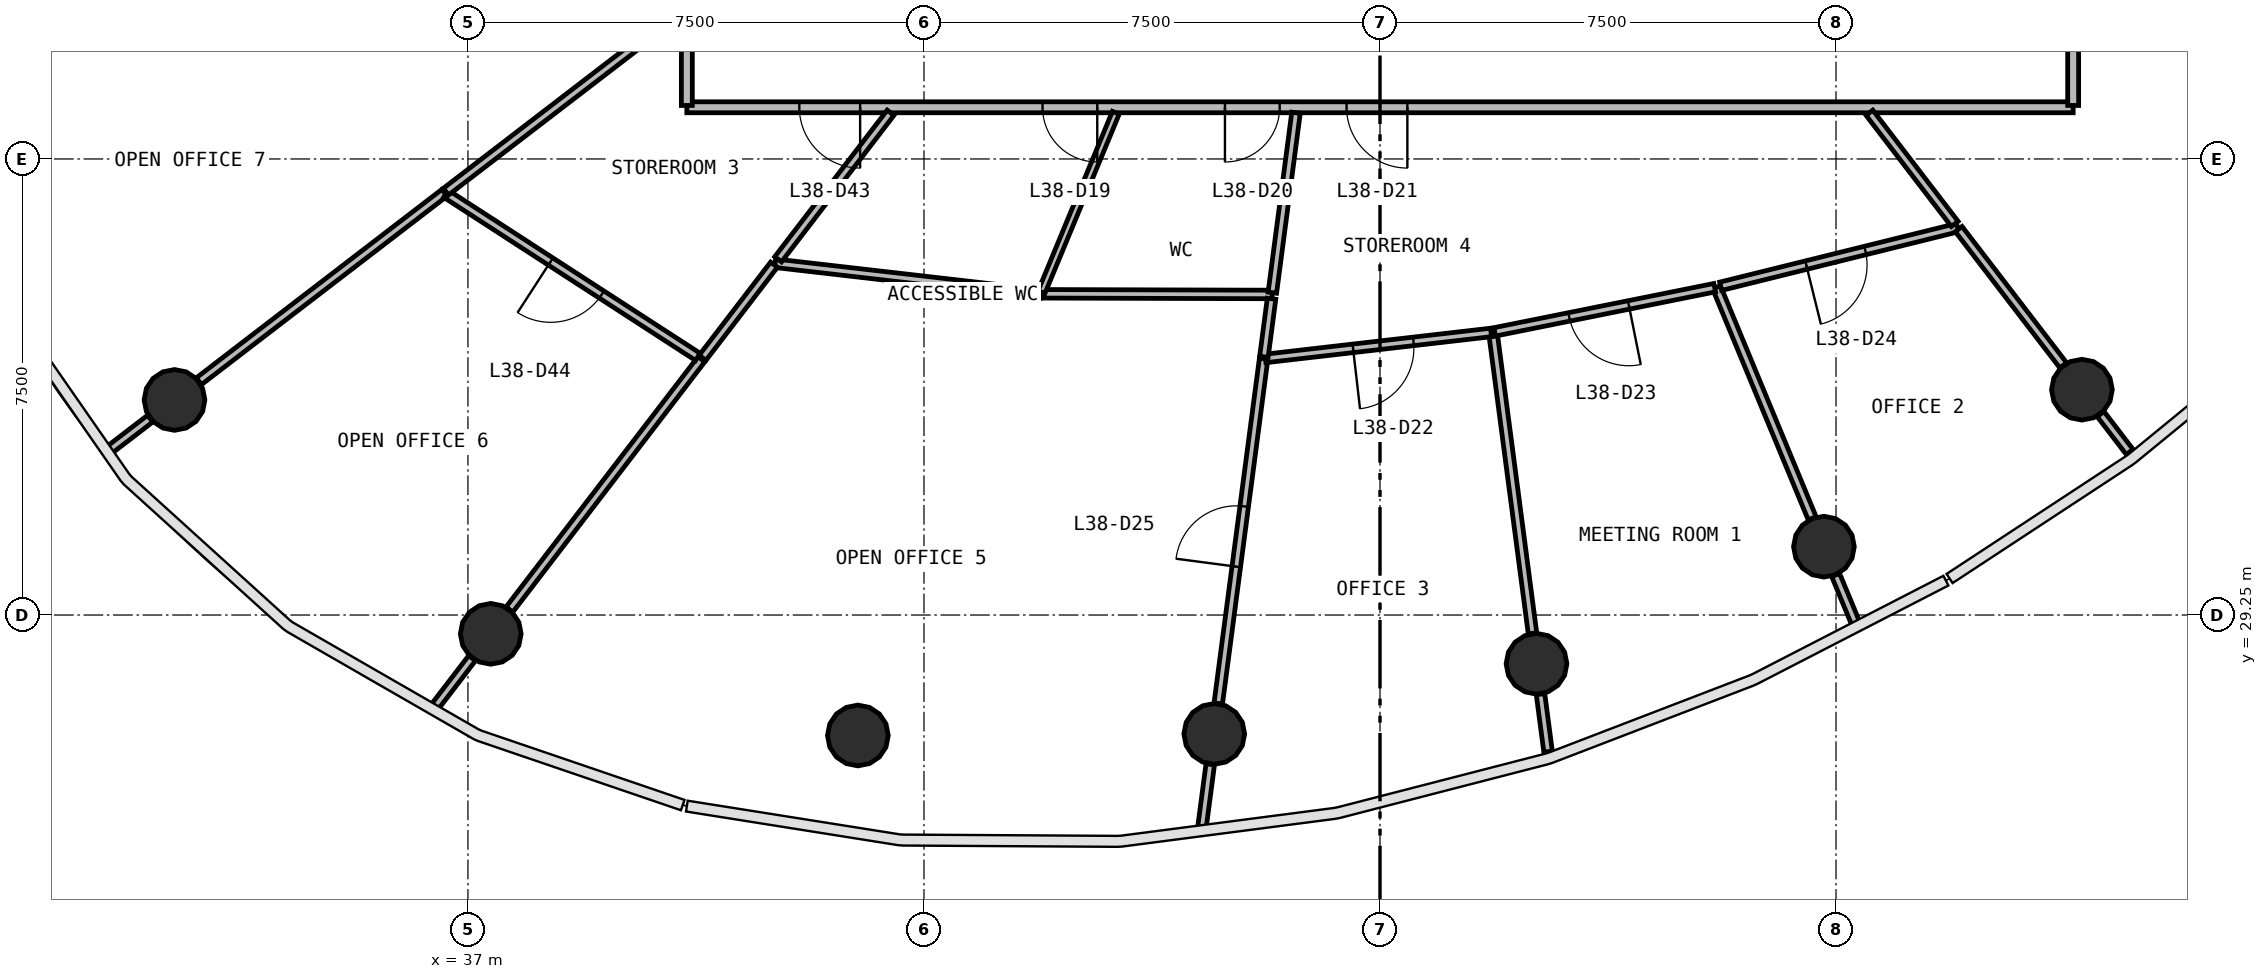
"""IFC4 building model, lengths in metres.
Left out: names, types, materials, properties, quantities, classifications, styles, units other than length and angle.
Written with IfcOpenShell. Run it as: python <this file> out.ifc"""

import sys

from ifc_helpers import new_model, si_unit, direction, frame, frame_2d, origin, origin_2d, place, context, subcontext, project, spatial, rectangle, circle, extrude, source, transform, mapped, element, fill, save


model = new_model("IFC4")
c1 = context("Model", 3, precision=1e-05, world=origin(), true_north=direction((0.0, 1.0)))
c2 = subcontext(c1, "Body", "Model", "MODEL_VIEW")
j1 = project(units=[si_unit("LENGTHUNIT", "METRE"), si_unit("PLANEANGLEUNIT", "RADIAN")], contexts=[c1])
p1 = place(None, origin())
s1 = spatial("IfcSite", under=j1, at=p1, CompositionType="ELEMENT")
p2 = place(p1, origin())
s2 = spatial("IfcBuilding", under=s1, at=p2, CompositionType="ELEMENT")
p3 = place(p2, frame((0.0, 0.0, 160.4)))
s3 = spatial("IfcBuildingStorey", under=s2, at=p3, CompositionType="ELEMENT", Elevation=160.4)
m1 = source(origin(), c2, "Body", "SweptSolid", [
    extrude(circle(Radius=0.5, at=origin_2d()), origin(), (0.0, 0.0, 1.0), 3.9),
])
for number, where, z_axis, x_axis in (
    (1, (32.174, 32.787, 0.0), (0.0, 0.0, 1.0), (1.0, 0.0, 0.0)),
    (2, (37.375, 28.94, 0.0), (0.0, 0.0, 1.0), (1.0, 0.0, 0.0)),
    (3, (43.413, 27.269, 0.0), (0.0, 0.0, 1.0), (1.0, 0.0, 0.0)),
    (4, (49.274, 27.295, 0.0), (0.0, 0.0, 1.0), (1.0, 0.0, 0.0)),
    (5, (54.574, 28.449, 0.0), (0.0, 0.0, 1.0), (1.0, 0.0, 0.0)),
    (6, (59.301, 30.374, 0.0), (0.0, 0.0, 1.0), (1.0, 0.0, 0.0)),
    (7, (63.544, 32.956, 0.0), (0.0, 0.0, 1.0), (1.0, 0.0, 0.0)),
):
    element("IfcColumn", number, at=place(p3, frame(where, z_axis=z_axis, x_axis=x_axis)), inside=s3, PredefinedType="COLUMN", context=c2, shape_type="MappedRepresentation", body=[
        mapped(m1, transform((0.0, 0.0, 0.0), scale=1.0)),
    ])
p4 = place(p3, frame((63.4, 37.6, 0.0), z_axis=(0.0, 0.0, 1.0), x_axis=(-1.0, 0.0, 0.0)))
e8 = element("IfcWall", 8, at=p4, inside=s3, PredefinedType="PARTITIONING", context=c2, shape_type="SweptSolid", body=[
    extrude(rectangle(XDim=22.8, YDim=0.18, at=frame_2d((11.4, 0.0))), origin(), (0.0, 0.0, 1.0), 2.88),
])
p5 = place(p4, frame((16.05, 0.0, 0.0)))
e9 = element("IfcOpeningElement", 9, at=p5, cuts=e8, PredefinedType="OPENING", context=c2, shape_type="SweptSolid", body=[
    extrude(rectangle(XDim=0.9, YDim=2.1, at=frame_2d((0.45, 1.05))), frame((0.0, 0.1, 0.0), z_axis=(0.0, -1.0, 0.0), x_axis=(1.0, 0.0, 0.0)), (0.0, 0.0, 1.0), 0.2),
])
p6 = place(p4, frame((13.05, 0.0, 0.0)))
e10 = element("IfcOpeningElement", 10, at=p6, cuts=e8, PredefinedType="OPENING", context=c2, shape_type="SweptSolid", body=[
    extrude(rectangle(XDim=0.9, YDim=2.1, at=frame_2d((0.45, 1.05))), frame((0.0, 0.1, 0.0), z_axis=(0.0, -1.0, 0.0), x_axis=(1.0, 0.0, 0.0)), (0.0, 0.0, 1.0), 0.2),
])
p7 = place(p4, frame((10.95, 0.0, 0.0)))
e11 = element("IfcOpeningElement", 11, at=p7, cuts=e8, PredefinedType="OPENING", context=c2, shape_type="SweptSolid", body=[
    extrude(rectangle(XDim=1.0, YDim=2.1, at=frame_2d((0.5, 1.05))), frame((0.0, 0.1, 0.0), z_axis=(0.0, -1.0, 0.0), x_axis=(1.0, 0.0, 0.0)), (0.0, 0.0, 1.0), 0.2),
])
p8 = place(p4, frame((19.95, 0.0, 0.0)))
e12 = element("IfcOpeningElement", 12, at=p8, cuts=e8, PredefinedType="OPENING", context=c2, shape_type="SweptSolid", body=[
    extrude(rectangle(XDim=1.0, YDim=2.1, at=frame_2d((0.5, 1.05))), frame((0.0, 0.1, 0.0), z_axis=(0.0, -1.0, 0.0), x_axis=(1.0, 0.0, 0.0)), (0.0, 0.0, 1.0), 0.2),
])
p9 = place(p3, frame((63.4, 58.37, 0.0), z_axis=(0.0, 0.0, 1.0), x_axis=(0.0, -1.0, 0.0)))
e13 = element("IfcWall", 13, at=p9, inside=s3, PredefinedType="PARTITIONING", context=c2, shape_type="SweptSolid", body=[
    extrude(rectangle(XDim=20.74, YDim=0.18, at=frame_2d((10.37, 0.0))), origin(), (0.0, 0.0, 1.0), 2.88),
])
p10 = place(p9, frame((15.49, 0.0, 0.0)))
e14 = element("IfcOpeningElement", 14, at=p10, cuts=e13, PredefinedType="OPENING", context=c2, shape_type="SweptSolid", body=[
    extrude(rectangle(XDim=1.0, YDim=2.1, at=frame_2d((0.5, 1.05))), frame((0.0, 0.1, 0.0), z_axis=(0.0, -1.0, 0.0), x_axis=(1.0, 0.0, 0.0)), (0.0, 0.0, 1.0), 0.2),
])
p11 = place(p9, frame((9.89, 0.0, 0.0)))
e15 = element("IfcOpeningElement", 15, at=p11, cuts=e13, PredefinedType="OPENING", context=c2, shape_type="SweptSolid", body=[
    extrude(rectangle(XDim=1.0, YDim=2.1, at=frame_2d((0.5, 1.05))), frame((0.0, 0.1, 0.0), z_axis=(0.0, -1.0, 0.0), x_axis=(1.0, 0.0, 0.0)), (0.0, 0.0, 1.0), 0.2),
])
p12 = place(p3, frame((40.6, 37.63, 0.0), z_axis=(0.0, 0.0, 1.0), x_axis=(0.0, 1.0, 0.0)))
e16 = element("IfcWall", 16, at=p12, inside=s3, PredefinedType="PARTITIONING", context=c2, shape_type="SweptSolid", body=[
    extrude(rectangle(XDim=20.74, YDim=0.18, at=frame_2d((10.37, 0.0))), origin(), (0.0, 0.0, 1.0), 2.88),
])
p13 = place(p12, frame((9.89, 0.0, 0.0)))
e17 = element("IfcOpeningElement", 17, at=p13, cuts=e16, PredefinedType="OPENING", context=c2, shape_type="SweptSolid", body=[
    extrude(rectangle(XDim=1.0, YDim=2.1, at=frame_2d((0.5, 1.05))), frame((0.0, 0.1, 0.0), z_axis=(0.0, -1.0, 0.0), x_axis=(1.0, 0.0, 0.0)), (0.0, 0.0, 1.0), 0.2),
])
p14 = place(p12, frame((4.29, 0.0, 0.0)))
e18 = element("IfcOpeningElement", 18, at=p14, cuts=e16, PredefinedType="OPENING", context=c2, shape_type="SweptSolid", body=[
    extrude(rectangle(XDim=1.0, YDim=2.1, at=frame_2d((0.5, 1.05))), frame((0.0, 0.1, 0.0), z_axis=(0.0, -1.0, 0.0), x_axis=(1.0, 0.0, 0.0)), (0.0, 0.0, 1.0), 0.2),
])
p15 = place(p3, frame((49.34, 27.795, 0.0), z_axis=(0.0, 0.0, 1.0), x_axis=(0.13055608231, 0.99144092581, 0.0)))
e19 = element("IfcWall", 19, at=p15, inside=s3, PredefinedType="PARTITIONING", context=c2, shape_type="SweptSolid", body=[
    extrude(rectangle(XDim=5.72, YDim=0.14, at=frame_2d((2.86, 0.0))), origin(), (0.0, 0.0, 1.0), 2.88),
])
p16 = place(p15, frame((2.271, 0.0, 0.0)))
e20 = element("IfcOpeningElement", 20, at=p16, cuts=e19, PredefinedType="OPENING", context=c2, shape_type="SweptSolid", body=[
    extrude(rectangle(XDim=1.0, YDim=2.1, at=frame_2d((0.5, 1.05))), frame((0.0, 0.08, 0.0), z_axis=(0.0, -1.0, 0.0), x_axis=(1.0, 0.0, 0.0)), (0.0, 0.0, 1.0), 0.16),
])
p17 = place(p3, frame((40.841, 33.457, 0.0), z_axis=(0.0, 0.0, 1.0), x_axis=(-0.608780216018, -0.793338924159, 0.0)))
e21 = element("IfcWall", 21, at=p17, inside=s3, PredefinedType="PARTITIONING", context=c2, shape_type="SweptSolid", body=[
    extrude(rectangle(XDim=5.188, YDim=0.14, at=frame_2d((2.594, 0.0))), origin(), (0.0, 0.0, 1.0), 2.88),
])
p18 = place(p3, frame((36.614, 36.194, 0.0), z_axis=(0.0, 0.0, 1.0), x_axis=(-0.79337017358, -0.608739490811, 0.0)))
e22 = element("IfcWall", 22, at=p18, inside=s3, PredefinedType="PARTITIONING", context=c2, shape_type="SweptSolid", body=[
    extrude(rectangle(XDim=5.092, YDim=0.14, at=frame_2d((2.546, 0.0))), origin(), (0.0, 0.0, 1.0), 2.88),
])
p19 = place(p3, frame((40.782, 33.495, 0.0), z_axis=(0.0, 0.0, 1.0), x_axis=(-0.839336490457, 0.543612229247, 0.0)))
e23 = element("IfcWall", 23, at=p19, inside=s3, PredefinedType="PARTITIONING", context=c2, shape_type="SweptSolid", body=[
    extrude(rectangle(XDim=4.935, YDim=0.14, at=frame_2d((2.468, 0.0))), origin(), (0.0, 0.0, 1.0), 2.88),
])
p20 = place(p19, frame((1.885, 0.0, 0.0)))
e24 = element("IfcOpeningElement", 24, at=p20, cuts=e23, PredefinedType="OPENING", context=c2, shape_type="SweptSolid", body=[
    extrude(rectangle(XDim=1.0, YDim=2.1, at=frame_2d((0.5, 1.05))), frame((0.0, 0.08, 0.0), z_axis=(0.0, -1.0, 0.0), x_axis=(1.0, 0.0, 0.0)), (0.0, 0.0, 1.0), 0.16),
])
p21 = place(p3, frame((40.51, 39.183, 0.0), z_axis=(0.0, 0.0, 1.0), x_axis=(-0.793354275357, -0.608760210405, 0.0)))
e25 = element("IfcWall", 25, at=p21, inside=s3, PredefinedType="PARTITIONING", context=c2, shape_type="SweptSolid", body=[
    extrude(rectangle(XDim=4.88, YDim=0.14, at=frame_2d((2.44, 0.0))), origin(), (0.0, 0.0, 1.0), 2.88),
])
p22 = place(p3, frame((53.856, 33.9, 0.0), z_axis=(0.0, 0.0, 1.0), x_axis=(0.130517737487, -0.991445974424, 0.0)))
e26 = element("IfcWall", 26, at=p22, inside=s3, PredefinedType="PARTITIONING", context=c2, shape_type="SweptSolid", body=[
    extrude(rectangle(XDim=4.994, YDim=0.14, at=frame_2d((2.497, 0.0))), origin(), (0.0, 0.0, 1.0), 2.88),
])
p23 = place(p3, frame((42.052, 35.035, 0.0), z_axis=(0.0, 0.0, 1.0), x_axis=(0.993448498383, -0.114280711669, 0.0)))
e27 = element("IfcWall", 27, at=p23, inside=s3, PredefinedType="PARTITIONING", context=c2, shape_type="SweptSolid", body=[
    extrude(rectangle(XDim=4.399, YDim=0.14, at=frame_2d((2.199, 0.0))), origin(), (0.0, 0.0, 1.0), 2.88),
])
p24 = place(p3, frame((57.534, 34.639, 0.0), z_axis=(0.0, 0.0, 1.0), x_axis=(0.382696163026, -0.923874259196, 0.0)))
e28 = element("IfcWall", 28, at=p24, inside=s3, PredefinedType="PARTITIONING", context=c2, shape_type="SweptSolid", body=[
    extrude(rectangle(XDim=4.112, YDim=0.14, at=frame_2d((2.056, 0.0))), origin(), (0.0, 0.0, 1.0), 2.88),
])
p25 = place(p3, frame((61.499, 35.621, 0.0), z_axis=(0.0, 0.0, 1.0), x_axis=(-0.970705214058, -0.240273567836, 0.0)))
e29 = element("IfcWall", 29, at=p25, inside=s3, PredefinedType="PARTITIONING", context=c2, shape_type="SweptSolid", body=[
    extrude(rectangle(XDim=4.014, YDim=0.14, at=frame_2d((2.007, 0.0))), origin(), (0.0, 0.0, 1.0), 2.88),
])
p26 = place(p25, frame((1.563, 0.0, 0.0)))
e30 = element("IfcOpeningElement", 30, at=p26, cuts=e29, PredefinedType="OPENING", context=c2, shape_type="SweptSolid", body=[
    extrude(rectangle(XDim=1.0, YDim=2.1, at=frame_2d((0.5, 1.05))), frame((0.0, 0.08, 0.0), z_axis=(0.0, -1.0, 0.0), x_axis=(1.0, 0.0, 0.0)), (0.0, 0.0, 1.0), 0.16),
])
p27 = place(p3, frame((46.452, 34.532, 0.0), z_axis=(0.0, 0.0, 1.0), x_axis=(0.999995948964, -0.002846411033, 0.0)))
e31 = element("IfcWall", 31, at=p27, inside=s3, PredefinedType="PARTITIONING", context=c2, shape_type="SweptSolid", body=[
    extrude(rectangle(XDim=3.774, YDim=0.14, at=frame_2d((1.887, 0.0))), origin(), (0.0, 0.0, 1.0), 2.88),
])
p28 = place(p3, frame((53.826, 33.897, 0.0), z_axis=(0.0, 0.0, 1.0), x_axis=(-0.993434107381, -0.114405744138, 0.0)))
e32 = element("IfcWall", 32, at=p28, inside=s3, PredefinedType="PARTITIONING", context=c2, shape_type="SweptSolid", body=[
    extrude(rectangle(XDim=3.734, YDim=0.14, at=frame_2d((1.867, 0.0))), origin(), (0.0, 0.0, 1.0), 2.88),
])
p29 = place(p28, frame((1.285, 0.0, 0.0)))
e33 = element("IfcOpeningElement", 33, at=p29, cuts=e32, PredefinedType="OPENING", context=c2, shape_type="SweptSolid", body=[
    extrude(rectangle(XDim=1.0, YDim=2.1, at=frame_2d((0.5, 1.05))), frame((0.0, 0.08, 0.0), z_axis=(0.0, -1.0, 0.0), x_axis=(1.0, 0.0, 0.0)), (0.0, 0.0, 1.0), 0.16),
])
p30 = place(p3, frame((57.505, 34.634, 0.0), z_axis=(0.0, 0.0, 1.0), x_axis=(-0.980399657824, -0.197019062376, 0.0)))
e34 = element("IfcWall", 34, at=p30, inside=s3, PredefinedType="PARTITIONING", context=c2, shape_type="SweptSolid", body=[
    extrude(rectangle(XDim=3.691, YDim=0.14, at=frame_2d((1.846, 0.0))), origin(), (0.0, 0.0, 1.0), 2.88),
])
p31 = place(p30, frame((1.441, 0.0, 0.0)))
e35 = element("IfcOpeningElement", 35, at=p31, cuts=e34, PredefinedType="OPENING", context=c2, shape_type="SweptSolid", body=[
    extrude(rectangle(XDim=1.0, YDim=2.1, at=frame_2d((0.5, 1.05))), frame((0.0, 0.08, 0.0), z_axis=(0.0, -1.0, 0.0), x_axis=(1.0, 0.0, 0.0)), (0.0, 0.0, 1.0), 0.16),
])
p32 = place(p3, frame((43.951, 37.51, 0.0), z_axis=(0.0, 0.0, 1.0), x_axis=(-0.608758797461, -0.793355359542, 0.0)))
e36 = element("IfcWall", 36, at=p32, inside=s3, PredefinedType="PARTITIONING", context=c2, shape_type="SweptSolid", body=[
    extrude(rectangle(XDim=3.038, YDim=0.14, at=frame_2d((1.519, 0.0))), origin(), (0.0, 0.0, 1.0), 2.88),
])
p33 = place(p3, frame((50.619, 37.51, 0.0), z_axis=(0.0, 0.0, 1.0), x_axis=(-0.13049684078, -0.991448725122, 0.0)))
e37 = element("IfcWall", 37, at=p33, inside=s3, PredefinedType="PARTITIONING", context=c2, shape_type="SweptSolid", body=[
    extrude(rectangle(XDim=2.984, YDim=0.14, at=frame_2d((1.492, 0.0))), origin(), (0.0, 0.0, 1.0), 2.88),
])
p34 = place(p3, frame((61.517, 35.597, 0.0), z_axis=(0.0, 0.0, 1.0), x_axis=(0.608716333524, -0.793387941238, 0.0)))
e38 = element("IfcWall", 38, at=p34, inside=s3, PredefinedType="PARTITIONING", context=c2, shape_type="SweptSolid", body=[
    extrude(rectangle(XDim=2.825, YDim=0.14, at=frame_2d((1.413, 0.0))), origin(), (0.0, 0.0, 1.0), 2.88),
])
p35 = place(p3, frame((60.049, 37.51, 0.0), z_axis=(0.0, 0.0, 1.0), x_axis=(0.608742818772, -0.793367620081, 0.0)))
e39 = element("IfcWall", 39, at=p35, inside=s3, PredefinedType="PARTITIONING", context=c2, shape_type="SweptSolid", body=[
    extrude(rectangle(XDim=2.305, YDim=0.14, at=frame_2d((1.152, 0.0))), origin(), (0.0, 0.0, 1.0), 2.88),
])
p36 = place(p3, frame((42.033, 35.011, 0.0), z_axis=(0.0, 0.0, 1.0), x_axis=(-0.608750262105, -0.793361908833, 0.0)))
e40 = element("IfcWall", 40, at=p36, inside=s3, PredefinedType="PARTITIONING", context=c2, shape_type="SweptSolid", body=[
    extrude(rectangle(XDim=1.929, YDim=0.14, at=frame_2d((0.965, 0.0))), origin(), (0.0, 0.0, 1.0), 2.88),
])
p37 = place(p3, frame((50.216, 34.452, 0.0), z_axis=(0.0, 0.0, 1.0), x_axis=(-0.130454512571, -0.991454295543, 0.0)))
e41 = element("IfcWall", 41, at=p37, inside=s3, PredefinedType="PARTITIONING", context=c2, shape_type="SweptSolid", body=[
    extrude(rectangle(XDim=0.964, YDim=0.14, at=frame_2d((0.482, 0.0))), origin(), (0.0, 0.0, 1.0), 2.88),
])
p38 = place(p3, frame((49.208, 26.795, 0.0), z_axis=(0.0, 0.0, 1.0), x_axis=(-0.130569518357, -0.991439156417, 0.0)))
e42 = element("IfcWall", 42, at=p38, inside=s3, PredefinedType="PARTITIONING", context=c2, shape_type="SweptSolid", body=[
    extrude(rectangle(XDim=1.043, YDim=0.14, at=frame_2d((0.522, 0.0))), origin(), (0.0, 0.0, 1.0), 2.88),
])
p39 = place(p3, frame((37.068, 28.54, 0.0), z_axis=(0.0, 0.0, 1.0), x_axis=(-0.608815264587, -0.793312027897, 0.0)))
e43 = element("IfcWall", 43, at=p39, inside=s3, PredefinedType="PARTITIONING", context=c2, shape_type="SweptSolid", body=[
    extrude(rectangle(XDim=1.015, YDim=0.14, at=frame_2d((0.507, 0.0))), origin(), (0.0, 0.0, 1.0), 2.88),
])
p40 = place(p3, frame((54.64, 27.948, 0.0), z_axis=(0.0, 0.0, 1.0), x_axis=(0.130434626054, -0.991456911987, 0.0)))
e44 = element("IfcWall", 44, at=p40, inside=s3, PredefinedType="PARTITIONING", context=c2, shape_type="SweptSolid", body=[
    extrude(rectangle(XDim=0.953, YDim=0.14, at=frame_2d((0.476, 0.0))), origin(), (0.0, 0.0, 1.0), 2.88),
])
p41 = place(p3, frame((59.494, 29.908, 0.0), z_axis=(0.0, 0.0, 1.0), x_axis=(0.382722863119, -0.923863198772, 0.0)))
e45 = element("IfcWall", 45, at=p41, inside=s3, PredefinedType="PARTITIONING", context=c2, shape_type="SweptSolid", body=[
    extrude(rectangle(XDim=0.852, YDim=0.14, at=frame_2d((0.426, 0.0))), origin(), (0.0, 0.0, 1.0), 2.88),
])
p42 = place(p3, frame((31.774, 32.48, 0.0), z_axis=(0.0, 0.0, 1.0), x_axis=(-0.793296212725, -0.608835871871, 0.0)))
e46 = element("IfcWall", 46, at=p42, inside=s3, PredefinedType="PARTITIONING", context=c2, shape_type="SweptSolid", body=[
    extrude(rectangle(XDim=0.836, YDim=0.14, at=frame_2d((0.418, 0.0))), origin(), (0.0, 0.0, 1.0), 2.88),
])
p43 = place(p3, frame((63.851, 32.555, 0.0), z_axis=(0.0, 0.0, 1.0), x_axis=(0.608659697441, -0.793431391307, 0.0)))
e47 = element("IfcWall", 47, at=p43, inside=s3, PredefinedType="PARTITIONING", context=c2, shape_type="SweptSolid", body=[
    extrude(rectangle(XDim=0.786, YDim=0.14, at=frame_2d((0.393, 0.0))), origin(), (0.0, 0.0, 1.0), 2.88),
])
p44 = place(p3, frame((47.655, 37.51, 0.0), z_axis=(0.0, 0.0, 1.0), x_axis=(-0.382648952505, -0.923893813783, 0.0)))
e48 = element("IfcWall", 48, at=p44, inside=s3, PredefinedType="PARTITIONING", context=c2, shape_type="SweptSolid", body=[
    extrude(rectangle(XDim=3.193, YDim=0.12, at=frame_2d((1.596, 0.0))), origin(), (0.0, 0.0, 1.0), 2.88),
])
m2 = source(origin(), c2, "Body", "SweptSolid", [
    extrude(rectangle(XDim=0.9, YDim=2.1, at=frame_2d((0.45, 1.05))), frame((0.0, 0.025, 0.0), z_axis=(0.0, -1.0, 0.0), x_axis=(1.0, 0.0, 0.0)), (0.0, 0.0, 1.0), 0.05),
])
p45 = place(p5, origin())
e49 = element("IfcDoor", 49, at=p45, inside=s3, OperationType="SINGLE_SWING_LEFT", PredefinedType="DOOR", context=c2, shape_type="MappedRepresentation", body=[
    mapped(m2, transform((0.0, 0.0, 0.0), scale=1.0)),
])
fill(e9, e49)
p46 = place(p6, origin())
e50 = element("IfcDoor", 50, at=p46, inside=s3, OperationType="SINGLE_SWING_RIGHT", PredefinedType="DOOR", context=c2, shape_type="MappedRepresentation", body=[
    mapped(m2, transform((0.0, 0.0, 0.0), scale=1.0)),
])
fill(e10, e50)
m3 = source(origin(), c2, "Body", "SweptSolid", [
    extrude(rectangle(XDim=1.0, YDim=2.1, at=frame_2d((0.5, 1.05))), frame((0.0, 0.025, 0.0), z_axis=(0.0, -1.0, 0.0), x_axis=(1.0, 0.0, 0.0)), (0.0, 0.0, 1.0), 0.05),
])
p47 = place(p7, origin())
e51 = element("IfcDoor", 51, at=p47, inside=s3, OperationType="SINGLE_SWING_LEFT", PredefinedType="DOOR", context=c2, shape_type="MappedRepresentation", body=[
    mapped(m3, transform((0.0, 0.0, 0.0), scale=1.0)),
])
fill(e11, e51)
p48 = place(p29, origin())
e52 = element("IfcDoor", 52, at=p48, inside=s3, OperationType="SINGLE_SWING_RIGHT", PredefinedType="DOOR", context=c2, shape_type="MappedRepresentation", body=[
    mapped(m3, transform((0.0, 0.0, 0.0), scale=1.0)),
])
fill(e33, e52)
p49 = place(p31, origin())
e53 = element("IfcDoor", 53, at=p49, inside=s3, OperationType="SINGLE_SWING_LEFT", PredefinedType="DOOR", context=c2, shape_type="MappedRepresentation", body=[
    mapped(m3, transform((0.0, 0.0, 0.0), scale=1.0)),
])
fill(e35, e53)
p50 = place(p26, origin())
e54 = element("IfcDoor", 54, at=p50, inside=s3, OperationType="SINGLE_SWING_RIGHT", PredefinedType="DOOR", context=c2, shape_type="MappedRepresentation", body=[
    mapped(m3, transform((0.0, 0.0, 0.0), scale=1.0)),
])
fill(e30, e54)
p51 = place(p16, origin())
e55 = element("IfcDoor", 55, at=p51, inside=s3, OperationType="SINGLE_SWING_LEFT", PredefinedType="DOOR", context=c2, shape_type="MappedRepresentation", body=[
    mapped(m3, transform((0.0, 0.0, 0.0), scale=1.0)),
])
fill(e20, e55)
p52 = place(p8, origin())
e56 = element("IfcDoor", 56, at=p52, inside=s3, OperationType="SINGLE_SWING_LEFT", PredefinedType="DOOR", context=c2, shape_type="MappedRepresentation", body=[
    mapped(m3, transform((0.0, 0.0, 0.0), scale=1.0)),
])
fill(e12, e56)
p53 = place(p20, origin())
e57 = element("IfcDoor", 57, at=p53, inside=s3, OperationType="SINGLE_SWING_RIGHT", PredefinedType="DOOR", context=c2, shape_type="MappedRepresentation", body=[
    mapped(m3, transform((0.0, 0.0, 0.0), scale=1.0)),
])
fill(e24, e57)
save(model, sys.argv[1])
